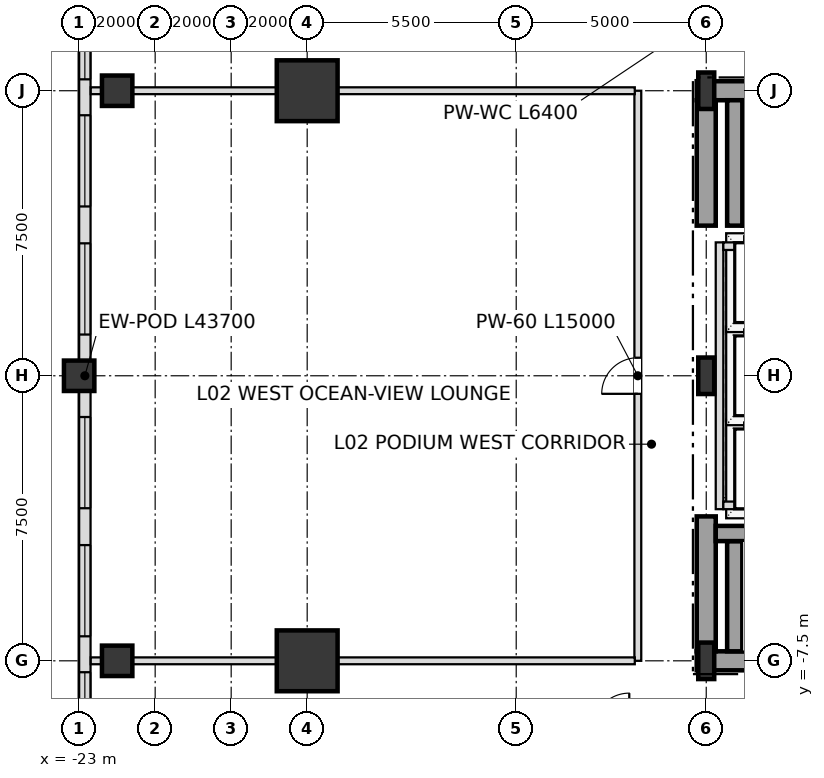
"""IFC4 building model, lengths in metres.
Left out: names, types, materials, properties, quantities, classifications, styles, units other than length and angle.
Written with IfcOpenShell. Run it as: python <this file> out.ifc"""

import sys

from ifc_helpers import new_model, si_unit, direction, frame, frame_2d, origin, origin_2d, place, context, subcontext, project, spatial, rectangle, i_section, extrude, element, fill, save


model = new_model("IFC4")
c1 = context("Model", 3, precision=1e-05, world=origin(), true_north=direction((0.0, 1.0)))
c2 = subcontext(c1, "Body", "Model", "MODEL_VIEW")
j1 = project(units=[si_unit("LENGTHUNIT", "METRE"), si_unit("PLANEANGLEUNIT", "RADIAN")], contexts=[c1])
p1 = place(None, origin())
s1 = spatial("IfcSite", under=j1, at=p1, CompositionType="ELEMENT")
p2 = place(p1, origin())
s2 = spatial("IfcBuilding", under=s1, at=p2, CompositionType="ELEMENT")
p3 = place(p2, frame((0.0, 0.0, 11.4)))
s3 = spatial("IfcBuildingStorey", under=s2, at=p3, CompositionType="ELEMENT", Elevation=11.4)
for number, where, z_axis, x_axis in (
    (1, (-6.5, -7.5, 0.0), (0.0, 0.0, 1.0), (1.0, 0.0, 0.0)),
    (2, (-6.5, 0.0, 0.0), (0.0, 0.0, 1.0), (1.0, 0.0, 0.0)),
    (3, (-6.5, 7.5, 0.0), (0.0, 0.0, 1.0), (1.0, 0.0, 0.0)),
):
    element("IfcColumn", number, at=place(p3, frame(where, z_axis=z_axis, x_axis=x_axis)), inside=s3, PredefinedType="COLUMN", context=c2, shape_type="SweptSolid", body=[
        extrude(i_section(OverallWidth=0.42, OverallDepth=0.96, WebThickness=0.022, FlangeThickness=0.034, at=origin_2d()), origin(), (0.0, 0.0, 1.0), 5.4),
    ])
for number, where, z_axis, x_axis in (
    (4, (-17.0, 7.5, 0.0), (0.0, 0.0, 1.0), (1.0, 0.0, 0.0)),
    (5, (-17.0, -7.5, 0.0), (0.0, 0.0, 1.0), (1.0, 0.0, 0.0)),
):
    element("IfcColumn", number, at=place(p3, frame(where, z_axis=z_axis, x_axis=x_axis)), inside=s3, PredefinedType="USERDEFINED", context=c2, shape_type="SweptSolid", body=[
        extrude(rectangle(XDim=1.6, YDim=1.6, at=origin_2d()), origin(), (0.0, 0.0, 1.0), 5.4),
    ])
for number, where, z_axis, x_axis in (
    (6, (-23.0, 0.0, 0.0), (0.0, 0.0, 1.0), (1.0, 0.0, 0.0)),
    (7, (-22.0, -7.5, 0.0), (0.0, 0.0, 1.0), (1.0, 0.0, 0.0)),
    (8, (-22.0, 7.5, 0.0), (0.0, 0.0, 1.0), (1.0, 0.0, 0.0)),
):
    element("IfcColumn", number, at=place(p3, frame(where, z_axis=z_axis, x_axis=x_axis)), inside=s3, PredefinedType="COLUMN", context=c2, shape_type="SweptSolid", body=[
        extrude(rectangle(XDim=0.8, YDim=0.8, at=origin_2d()), origin(), (0.0, 0.0, 1.0), 5.4),
    ])
p4 = place(p3, frame((-22.85, 21.85, 0.0), z_axis=(0.0, 0.0, 1.0), x_axis=(0.0, -1.0, 0.0)))
e9 = element("IfcWall", 9, at=p4, inside=s3, PredefinedType="SOLIDWALL", context=c2, shape_type="SweptSolid", body=[
    extrude(rectangle(XDim=43.7, YDim=0.3, at=frame_2d((21.85, 0.0))), origin(), (0.0, 0.0, 1.0), 4.476),
])
p5 = place(p4, frame((3.02, 0.0, 0.8)))
e10 = element("IfcOpeningElement", 10, at=p5, cuts=e9, PredefinedType="OPENING", context=c2, shape_type="SweptSolid", body=[
    extrude(rectangle(XDim=2.4, YDim=2.2, at=frame_2d((1.2, 1.1))), frame((0.0, 0.16, 0.0), z_axis=(0.0, -1.0, 0.0), x_axis=(1.0, 0.0, 0.0)), (0.0, 0.0, 1.0), 0.32),
])
p6 = place(p4, frame((6.68, 0.0, 0.72)))
e11 = element("IfcOpeningElement", 11, at=p6, cuts=e9, PredefinedType="OPENING", context=c2, shape_type="SweptSolid", body=[
    extrude(rectangle(XDim=1.2, YDim=1.68, at=frame_2d((0.6, 0.84))), frame((0.0, 0.16, 0.0), z_axis=(0.0, -1.0, 0.0), x_axis=(1.0, 0.0, 0.0)), (0.0, 0.0, 1.0), 0.32),
])
p7 = place(p4, frame((9.72, 0.0, 0.8)))
e12 = element("IfcOpeningElement", 12, at=p7, cuts=e9, PredefinedType="OPENING", context=c2, shape_type="SweptSolid", body=[
    extrude(rectangle(XDim=2.4, YDim=2.2, at=frame_2d((1.2, 1.1))), frame((0.0, 0.16, 0.0), z_axis=(0.0, -1.0, 0.0), x_axis=(1.0, 0.0, 0.0)), (0.0, 0.0, 1.0), 0.32),
])
p8 = place(p4, frame((12.85, 0.0, 0.72)))
e13 = element("IfcOpeningElement", 13, at=p8, cuts=e9, PredefinedType="OPENING", context=c2, shape_type="SweptSolid", body=[
    extrude(rectangle(XDim=1.2, YDim=1.68, at=frame_2d((0.6, 0.84))), frame((0.0, 0.16, 0.0), z_axis=(0.0, -1.0, 0.0), x_axis=(1.0, 0.0, 0.0)), (0.0, 0.0, 1.0), 0.32),
])
p9 = place(p4, frame((14.995, 0.0, 0.8)))
e14 = element("IfcOpeningElement", 14, at=p9, cuts=e9, PredefinedType="OPENING", context=c2, shape_type="SweptSolid", body=[
    extrude(rectangle(XDim=2.4, YDim=2.2, at=frame_2d((1.2, 1.1))), frame((0.0, 0.16, 0.0), z_axis=(0.0, -1.0, 0.0), x_axis=(1.0, 0.0, 0.0)), (0.0, 0.0, 1.0), 0.32),
])
p10 = place(p4, frame((18.365, 0.0, 0.8)))
e15 = element("IfcOpeningElement", 15, at=p10, cuts=e9, PredefinedType="OPENING", context=c2, shape_type="SweptSolid", body=[
    extrude(rectangle(XDim=2.4, YDim=2.2, at=frame_2d((1.2, 1.1))), frame((0.0, 0.16, 0.0), z_axis=(0.0, -1.0, 0.0), x_axis=(1.0, 0.0, 0.0)), (0.0, 0.0, 1.0), 0.32),
])
p11 = place(p4, frame((22.935, 0.0, 0.8)))
e16 = element("IfcOpeningElement", 16, at=p11, cuts=e9, PredefinedType="OPENING", context=c2, shape_type="SweptSolid", body=[
    extrude(rectangle(XDim=2.4, YDim=2.2, at=frame_2d((1.2, 1.1))), frame((0.0, 0.16, 0.0), z_axis=(0.0, -1.0, 0.0), x_axis=(1.0, 0.0, 0.0)), (0.0, 0.0, 1.0), 0.32),
])
p12 = place(p4, frame((26.305, 0.0, 0.8)))
e17 = element("IfcOpeningElement", 17, at=p12, cuts=e9, PredefinedType="OPENING", context=c2, shape_type="SweptSolid", body=[
    extrude(rectangle(XDim=2.4, YDim=2.2, at=frame_2d((1.2, 1.1))), frame((0.0, 0.16, 0.0), z_axis=(0.0, -1.0, 0.0), x_axis=(1.0, 0.0, 0.0)), (0.0, 0.0, 1.0), 0.32),
])
p13 = place(p4, frame((29.65, 0.0, 0.72)))
e18 = element("IfcOpeningElement", 18, at=p13, cuts=e9, PredefinedType="OPENING", context=c2, shape_type="SweptSolid", body=[
    extrude(rectangle(XDim=1.2, YDim=1.68, at=frame_2d((0.6, 0.84))), frame((0.0, 0.16, 0.0), z_axis=(0.0, -1.0, 0.0), x_axis=(1.0, 0.0, 0.0)), (0.0, 0.0, 1.0), 0.32),
])
p14 = place(p4, frame((31.58, 0.0, 0.8)))
e19 = element("IfcOpeningElement", 19, at=p14, cuts=e9, PredefinedType="OPENING", context=c2, shape_type="SweptSolid", body=[
    extrude(rectangle(XDim=2.4, YDim=2.2, at=frame_2d((1.2, 1.1))), frame((0.0, 0.16, 0.0), z_axis=(0.0, -1.0, 0.0), x_axis=(1.0, 0.0, 0.0)), (0.0, 0.0, 1.0), 0.32),
])
p15 = place(p4, frame((37.15, 0.0, 0.8)))
e20 = element("IfcOpeningElement", 20, at=p15, cuts=e9, PredefinedType="OPENING", context=c2, shape_type="SweptSolid", body=[
    extrude(rectangle(XDim=2.4, YDim=2.2, at=frame_2d((1.2, 1.1))), frame((0.0, 0.16, 0.0), z_axis=(0.0, -1.0, 0.0), x_axis=(1.0, 0.0, 0.0)), (0.0, 0.0, 1.0), 0.32),
])
p16 = place(p3, frame((-6.75, -7.5, 0.0), z_axis=(0.0, 0.0, 1.0), x_axis=(1.0, 0.0, 0.0)))
e21 = element("IfcWall", 21, at=p16, inside=s3, PredefinedType="SHEAR", context=c2, shape_type="SweptSolid", body=[
    extrude(rectangle(XDim=6.75, YDim=0.5, at=frame_2d((3.375, 0.0))), origin(), (0.0, 0.0, 1.0), 5.12),
])
p17 = place(p3, frame((-6.75, 7.5, 0.0), z_axis=(0.0, 0.0, 1.0), x_axis=(1.0, 0.0, 0.0)))
e22 = element("IfcWall", 22, at=p17, inside=s3, PredefinedType="SHEAR", context=c2, shape_type="SweptSolid", body=[
    extrude(rectangle(XDim=6.75, YDim=0.5, at=frame_2d((3.375, 0.0))), origin(), (0.0, 0.0, 1.0), 5.12),
])
p18 = place(p17, frame((1.65, 0.0, 0.0)))
e23 = element("IfcOpeningElement", 23, at=p18, cuts=e22, PredefinedType="OPENING", context=c2, shape_type="SweptSolid", body=[
    extrude(rectangle(XDim=1.05, YDim=2.15, at=frame_2d((0.525, 1.075))), frame((0.0, 0.26, 0.0), z_axis=(0.0, -1.0, 0.0), x_axis=(1.0, 0.0, 0.0)), (0.0, 0.0, 1.0), 0.52),
])
p19 = place(p3, frame((-6.5, -7.25, 0.0), z_axis=(0.0, 0.0, 1.0), x_axis=(0.0, 1.0, 0.0)))
e24 = element("IfcWall", 24, at=p19, inside=s3, PredefinedType="SHEAR", context=c2, shape_type="SweptSolid", body=[
    extrude(rectangle(XDim=3.55, YDim=0.5, at=frame_2d((1.775, 0.0))), origin(), (0.0, 0.0, 1.0), 5.12),
])
p20 = place(p3, frame((-6.5, 3.95, 0.0), z_axis=(0.0, 0.0, 1.0), x_axis=(0.0, 1.0, 0.0)))
e25 = element("IfcWall", 25, at=p20, inside=s3, PredefinedType="SHEAR", context=c2, shape_type="SweptSolid", body=[
    extrude(rectangle(XDim=3.3, YDim=0.5, at=frame_2d((1.65, 0.0))), origin(), (0.0, 0.0, 1.0), 5.12),
])
p21 = place(p3, frame((-5.75, -7.25, 0.0), z_axis=(0.0, 0.0, 1.0), x_axis=(0.0, 1.0, 0.0)))
e26 = element("IfcWall", 26, at=p21, inside=s3, PredefinedType="SHEAR", context=c2, shape_type="SweptSolid", body=[
    extrude(rectangle(XDim=2.9, YDim=0.4, at=frame_2d((1.45, 0.0))), origin(), (0.0, 0.0, 1.0), 5.12),
])
p22 = place(p3, frame((-6.25, -4.15, 0.0), z_axis=(0.0, 0.0, 1.0), x_axis=(1.0, 0.0, 0.0)))
e27 = element("IfcWall", 27, at=p22, inside=s3, PredefinedType="SHEAR", context=c2, shape_type="SweptSolid", body=[
    extrude(rectangle(XDim=7.78, YDim=0.4, at=frame_2d((3.89, 0.0))), origin(), (0.0, 0.0, 1.0), 5.12),
])
p23 = place(p3, frame((-5.55, 4.15, 0.0), z_axis=(0.0, 0.0, 1.0), x_axis=(1.0, 0.0, 0.0)))
e28 = element("IfcWall", 28, at=p23, inside=s3, PredefinedType="SHEAR", context=c2, shape_type="SweptSolid", body=[
    extrude(rectangle(XDim=7.08, YDim=0.4, at=frame_2d((3.54, 0.0))), origin(), (0.0, 0.0, 1.0), 5.12),
])
p24 = place(p3, frame((-5.75, 3.95, 0.0), z_axis=(0.0, 0.0, 1.0), x_axis=(0.0, 1.0, 0.0)))
e29 = element("IfcWall", 29, at=p24, inside=s3, PredefinedType="SHEAR", context=c2, shape_type="SweptSolid", body=[
    extrude(rectangle(XDim=3.3, YDim=0.4, at=frame_2d((1.65, 0.0))), origin(), (0.0, 0.0, 1.0), 5.12),
])
p25 = place(p3, frame((-6.15, -3.51, 0.0), z_axis=(0.0, 0.0, 1.0), x_axis=(0.0, 1.0, 0.0)))
e30 = element("IfcWall", 30, at=p25, inside=s3, PredefinedType="SOLIDWALL", context=c2, shape_type="SweptSolid", body=[
    extrude(rectangle(XDim=7.02, YDim=0.2, at=frame_2d((3.51, 0.0))), origin(), (0.0, 0.0, 1.0), 5.12),
])
for number, where, z_axis, x_axis in (
    (31, (-6.05, -3.41, 0.0), (0.0, 0.0, 1.0), (1.0, 0.0, 0.0)),
    (32, (-6.05, 3.41, 0.0), (0.0, 0.0, 1.0), (1.0, 0.0, 0.0)),
):
    element("IfcWall", number, at=place(p3, frame(where, z_axis=z_axis, x_axis=x_axis)), inside=s3, PredefinedType="SOLIDWALL", context=c2, shape_type="SweptSolid", body=[
        extrude(rectangle(XDim=2.2, YDim=0.2, at=frame_2d((1.1, 0.0))), origin(), (0.0, 0.0, 1.0), 5.12),
    ])
p26 = place(p3, frame((-8.3, -7.5, 0.0), z_axis=(0.0, 0.0, 1.0), x_axis=(0.0, 1.0, 0.0)))
e33 = element("IfcWall", 33, at=p26, inside=s3, PredefinedType="PARTITIONING", context=c2, shape_type="SweptSolid", body=[
    extrude(rectangle(XDim=15.0, YDim=0.18, at=frame_2d((7.5, 0.0))), origin(), (0.0, 0.0, 1.0), 5.12),
])
p27 = place(p26, frame((7.025, 0.0, 0.0)))
e34 = element("IfcOpeningElement", 34, at=p27, cuts=e33, PredefinedType="OPENING", context=c2, shape_type="SweptSolid", body=[
    extrude(rectangle(XDim=0.95, YDim=2.15, at=frame_2d((0.475, 1.075))), frame((0.0, 0.1, 0.0), z_axis=(0.0, -1.0, 0.0), x_axis=(1.0, 0.0, 0.0)), (0.0, 0.0, 1.0), 0.2),
])
for number, where, z_axis, x_axis in (
    (35, (-22.695, -7.5, 0.0), (0.0, 0.0, 1.0), (1.0, 0.0, 0.0)),
    (36, (-22.695, 7.5, 0.0), (0.0, 0.0, 1.0), (1.0, 0.0, 0.0)),
):
    element("IfcWall", number, at=place(p3, frame(where, z_axis=z_axis, x_axis=x_axis)), inside=s3, PredefinedType="PARTITIONING", context=c2, shape_type="SweptSolid", body=[
        extrude(rectangle(XDim=14.315, YDim=0.18, at=frame_2d((7.158, 0.0))), origin(), (0.0, 0.0, 1.0), 4.41),
    ])
p28 = place(p8, origin())
e37 = element("IfcWindow", 37, at=p28, inside=s3, PartitioningType="SINGLE_PANEL", PredefinedType="WINDOW", context=c2, shape_type="SweptSolid", body=[
    extrude(rectangle(XDim=1.2, YDim=1.68, at=frame_2d((0.6, 0.84))), frame((0.0, 0.03, 0.0), z_axis=(0.0, -1.0, 0.0), x_axis=(1.0, 0.0, 0.0)), (0.0, 0.0, 1.0), 0.06),
])
fill(e13, e37)
p29 = place(p9, origin())
e38 = element("IfcWindow", 38, at=p29, inside=s3, PartitioningType="SINGLE_PANEL", PredefinedType="WINDOW", context=c2, shape_type="SweptSolid", body=[
    extrude(rectangle(XDim=2.4, YDim=2.2, at=frame_2d((1.2, 1.1))), frame((0.0, 0.03, 0.0), z_axis=(0.0, -1.0, 0.0), x_axis=(1.0, 0.0, 0.0)), (0.0, 0.0, 1.0), 0.06),
])
fill(e14, e38)
p30 = place(p10, origin())
e39 = element("IfcWindow", 39, at=p30, inside=s3, PartitioningType="SINGLE_PANEL", PredefinedType="WINDOW", context=c2, shape_type="SweptSolid", body=[
    extrude(rectangle(XDim=2.4, YDim=2.2, at=frame_2d((1.2, 1.1))), frame((0.0, 0.03, 0.0), z_axis=(0.0, -1.0, 0.0), x_axis=(1.0, 0.0, 0.0)), (0.0, 0.0, 1.0), 0.06),
])
fill(e15, e39)
p31 = place(p11, origin())
e40 = element("IfcWindow", 40, at=p31, inside=s3, PartitioningType="SINGLE_PANEL", PredefinedType="WINDOW", context=c2, shape_type="SweptSolid", body=[
    extrude(rectangle(XDim=2.4, YDim=2.2, at=frame_2d((1.2, 1.1))), frame((0.0, 0.03, 0.0), z_axis=(0.0, -1.0, 0.0), x_axis=(1.0, 0.0, 0.0)), (0.0, 0.0, 1.0), 0.06),
])
fill(e16, e40)
p32 = place(p12, origin())
e41 = element("IfcWindow", 41, at=p32, inside=s3, PartitioningType="SINGLE_PANEL", PredefinedType="WINDOW", context=c2, shape_type="SweptSolid", body=[
    extrude(rectangle(XDim=2.4, YDim=2.2, at=frame_2d((1.2, 1.1))), frame((0.0, 0.03, 0.0), z_axis=(0.0, -1.0, 0.0), x_axis=(1.0, 0.0, 0.0)), (0.0, 0.0, 1.0), 0.06),
])
fill(e17, e41)
p33 = place(p13, origin())
e42 = element("IfcWindow", 42, at=p33, inside=s3, PartitioningType="SINGLE_PANEL", PredefinedType="WINDOW", context=c2, shape_type="SweptSolid", body=[
    extrude(rectangle(XDim=1.2, YDim=1.68, at=frame_2d((0.6, 0.84))), frame((0.0, 0.03, 0.0), z_axis=(0.0, -1.0, 0.0), x_axis=(1.0, 0.0, 0.0)), (0.0, 0.0, 1.0), 0.06),
])
fill(e18, e42)
p34 = place(p27, origin())
e43 = element("IfcDoor", 43, at=p34, inside=s3, OperationType="SINGLE_SWING_LEFT", PredefinedType="DOOR", context=c2, shape_type="SweptSolid", body=[
    extrude(rectangle(XDim=0.95, YDim=2.15, at=frame_2d((0.475, 1.075))), frame((0.0, 0.025, 0.0), z_axis=(0.0, -1.0, 0.0), x_axis=(1.0, 0.0, 0.0)), (0.0, 0.0, 1.0), 0.05),
])
fill(e34, e43)
save(model, sys.argv[1])
